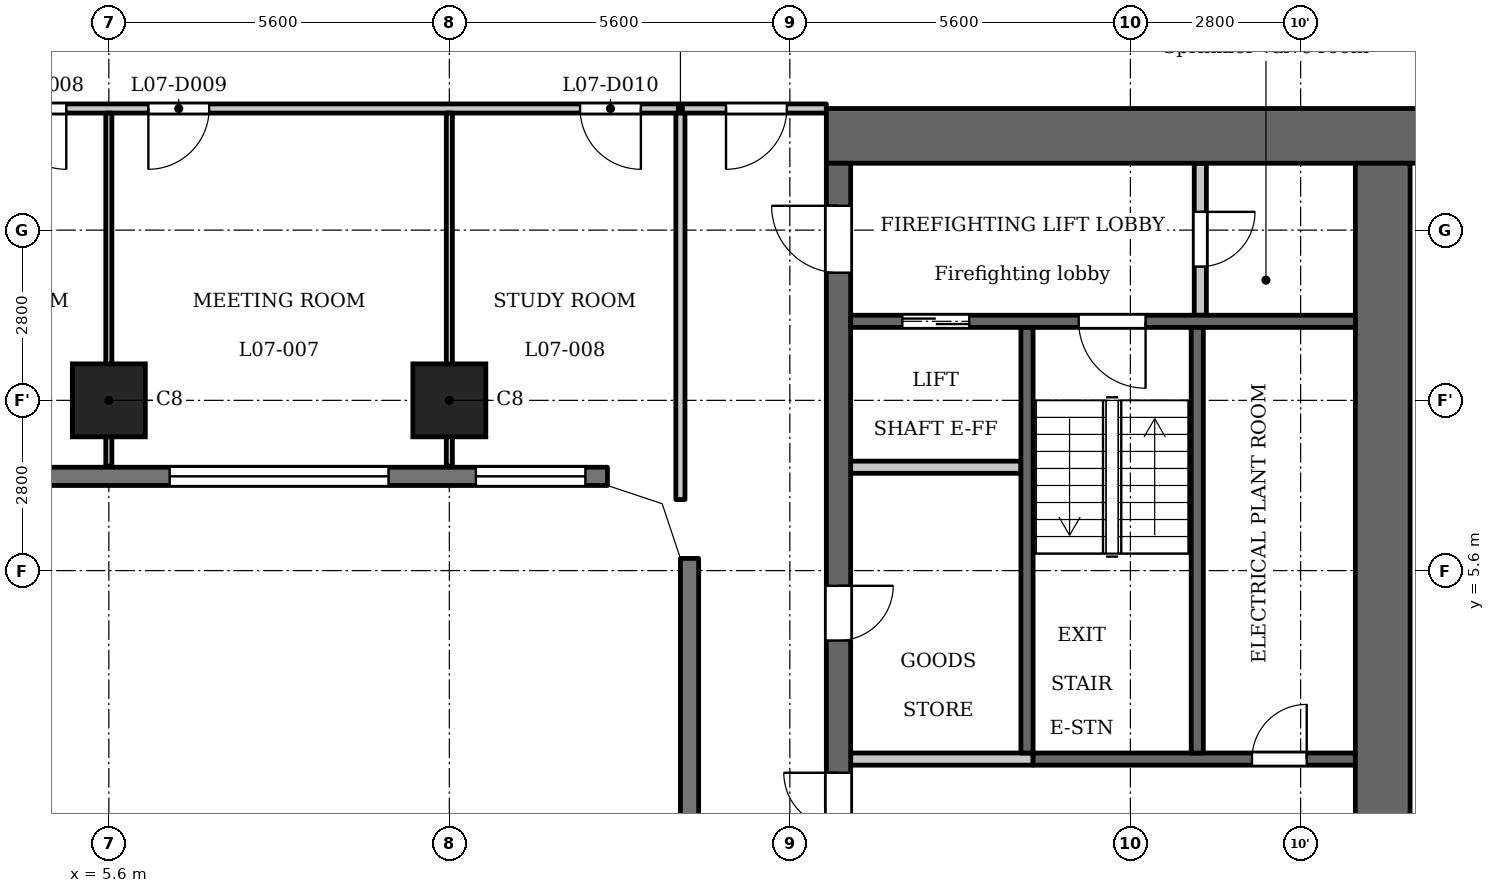
"""IFC4 building model, lengths in metres.
Left out: names, types, materials, properties, quantities, classifications, styles, units other than length and angle.
Written with IfcOpenShell. Run it as: python <this file> out.ifc"""

import sys

from ifc_helpers import new_model, si_unit, direction, frame, frame_2d, origin, origin_2d, place, context, subcontext, project, spatial, polyline, rectangle, outline, extrude, element, fill, save


model = new_model("IFC4")
c1 = context("Model", 3, precision=1e-05, world=origin(), true_north=direction((0.0, 1.0)))
c2 = subcontext(c1, "Body", "Model", "MODEL_VIEW")
j1 = project(units=[si_unit("LENGTHUNIT", "METRE"), si_unit("PLANEANGLEUNIT", "RADIAN")], contexts=[c1])
p1 = place(None, origin())
s1 = spatial("IfcSite", under=j1, at=p1, CompositionType="ELEMENT")
p2 = place(p1, origin())
s2 = spatial("IfcBuilding", under=s1, at=p2, CompositionType="ELEMENT")
p3 = place(p2, frame((0.0, 0.0, 34.0)))
s3 = spatial("IfcBuildingStorey", under=s2, at=p3, CompositionType="ELEMENT", Elevation=34.0)
for number, where, z_axis, x_axis in (
    (1, (5.6, 8.4, 0.0), (0.0, 0.0, 1.0), (1.0, 0.0, 0.0)),
    (2, (11.2, 8.4, 0.0), (0.0, 0.0, 1.0), (1.0, 0.0, 0.0)),
):
    element("IfcColumn", number, at=place(p3, frame(where, z_axis=z_axis, x_axis=x_axis)), inside=s3, PredefinedType="COLUMN", context=c2, shape_type="SweptSolid", body=[
        extrude(rectangle(XDim=1.2, YDim=1.2, at=origin_2d()), origin(), (0.0, 0.0, 1.0), 3.5),
    ])
p4 = place(p3, frame((-13.8, 7.15, 0.0), z_axis=(0.0, 0.0, 1.0), x_axis=(1.0, 0.0, 0.0)))
e3 = element("IfcWall", 3, at=p4, inside=s3, PredefinedType="SOLIDWALL", context=c2, shape_type="SweptSolid", body=[
    extrude(rectangle(XDim=27.6, YDim=0.3, at=frame_2d((13.8, 0.0))), origin(), (0.0, 0.0, 1.0), 3.2),
])
p5 = place(p4, frame((0.363, 0.0, 0.9)))
e4 = element("IfcOpeningElement", 4, at=p5, cuts=e3, PredefinedType="OPENING", context=c2, shape_type="SweptSolid", body=[
    extrude(rectangle(XDim=1.8, YDim=1.25, at=frame_2d((0.9, 0.625))), frame((0.0, 0.16, 0.0), z_axis=(0.0, -1.0, 0.0), x_axis=(1.0, 0.0, 0.0)), (0.0, 0.0, 1.0), 0.32),
])
p6 = place(p4, frame((3.6, 0.0, 1.2)))
e5 = element("IfcOpeningElement", 5, at=p6, cuts=e3, PredefinedType="OPENING", context=c2, shape_type="SweptSolid", body=[
    extrude(rectangle(XDim=3.6, YDim=0.95, at=frame_2d((1.8, 0.475))), frame((0.0, 0.16, 0.0), z_axis=(0.0, -1.0, 0.0), x_axis=(1.0, 0.0, 0.0)), (0.0, 0.0, 1.0), 0.32),
])
p7 = place(p4, frame((9.2, 0.0, 1.2)))
e6 = element("IfcOpeningElement", 6, at=p7, cuts=e3, PredefinedType="OPENING", context=c2, shape_type="SweptSolid", body=[
    extrude(rectangle(XDim=3.6, YDim=0.95, at=frame_2d((1.8, 0.475))), frame((0.0, 0.16, 0.0), z_axis=(0.0, -1.0, 0.0), x_axis=(1.0, 0.0, 0.0)), (0.0, 0.0, 1.0), 0.32),
])
p8 = place(p4, frame((14.8, 0.0, 1.2)))
e7 = element("IfcOpeningElement", 7, at=p8, cuts=e3, PredefinedType="OPENING", context=c2, shape_type="SweptSolid", body=[
    extrude(rectangle(XDim=3.6, YDim=0.95, at=frame_2d((1.8, 0.475))), frame((0.0, 0.16, 0.0), z_axis=(0.0, -1.0, 0.0), x_axis=(1.0, 0.0, 0.0)), (0.0, 0.0, 1.0), 0.32),
])
p9 = place(p4, frame((20.4, 0.0, 1.2)))
e8 = element("IfcOpeningElement", 8, at=p9, cuts=e3, PredefinedType="OPENING", context=c2, shape_type="SweptSolid", body=[
    extrude(rectangle(XDim=3.6, YDim=0.95, at=frame_2d((1.8, 0.475))), frame((0.0, 0.16, 0.0), z_axis=(0.0, -1.0, 0.0), x_axis=(1.0, 0.0, 0.0)), (0.0, 0.0, 1.0), 0.32),
])
p10 = place(p4, frame((25.438, 0.0, 0.9)))
e9 = element("IfcOpeningElement", 9, at=p10, cuts=e3, PredefinedType="OPENING", context=c2, shape_type="SweptSolid", body=[
    extrude(rectangle(XDim=1.8, YDim=1.25, at=frame_2d((0.9, 0.625))), frame((0.0, 0.16, 0.0), z_axis=(0.0, -1.0, 0.0), x_axis=(1.0, 0.0, 0.0)), (0.0, 0.0, 1.0), 0.32),
])
p11 = place(p3, frame((15.15, 5.8, 0.0), z_axis=(0.0, 0.0, 1.0), x_axis=(0.0, -1.0, 0.0)))
e10 = element("IfcWall", 10, at=p11, inside=s3, PredefinedType="SOLIDWALL", context=c2, shape_type="SweptSolid", body=[
    extrude(rectangle(XDim=11.6, YDim=0.3, at=frame_2d((5.8, 0.0))), origin(), (0.0, 0.0, 1.0), 3.2),
])
p12 = place(p3, frame((20.7, 2.6, 0.0), z_axis=(0.0, 0.0, 1.0), x_axis=(0.0, 1.0, 0.0)))
e11 = element("IfcWall", 11, at=p12, inside=s3, PredefinedType="SHEAR", context=c2, shape_type="SweptSolid", body=[
    extrude(rectangle(XDim=7.0, YDim=0.2, at=frame_2d((3.5, 0.0))), origin(), (0.0, 0.0, 1.0), 3.2),
])
p13 = place(p3, frame((20.8, 2.5, 0.0), z_axis=(0.0, 0.0, 1.0), x_axis=(1.0, 0.0, 0.0)))
e12 = element("IfcWall", 12, at=p13, inside=s3, PredefinedType="SHEAR", context=c2, shape_type="SweptSolid", body=[
    extrude(rectangle(XDim=5.3, YDim=0.2, at=frame_2d((2.65, 0.0))), origin(), (0.0, 0.0, 1.0), 3.2),
])
p14 = place(p13, frame((3.6, 0.0, 0.0)))
e13 = element("IfcOpeningElement", 13, at=p14, cuts=e12, PredefinedType="OPENING", context=c2, shape_type="SweptSolid", body=[
    extrude(rectangle(XDim=0.9, YDim=2.1, at=frame_2d((0.45, 1.05))), frame((0.0, 0.11, 0.0), z_axis=(0.0, -1.0, 0.0), x_axis=(1.0, 0.0, 0.0)), (0.0, 0.0, 1.0), 0.22),
])
p15 = place(p3, frame((17.4, 12.75, 0.0), z_axis=(0.0, 0.0, 1.0), x_axis=(1.0, 0.0, 0.0)))
e14 = element("IfcWall", 14, at=p15, inside=s3, PredefinedType="SHEAR", context=c2, shape_type="SweptSolid", body=[
    extrude(rectangle(XDim=10.4, YDim=0.9, at=frame_2d((5.2, 0.0))), origin(), (0.0, 0.0, 1.0), 3.2),
])
p16 = place(p3, frame((17.6, -12.3, 0.0), z_axis=(0.0, 0.0, 1.0), x_axis=(0.0, 1.0, 0.0)))
e15 = element("IfcWall", 15, at=p16, inside=s3, PredefinedType="SHEAR", context=c2, shape_type="SweptSolid", body=[
    extrude(rectangle(XDim=24.6, YDim=0.4, at=frame_2d((12.3, 0.0))), origin(), (0.0, 0.0, 1.0), 3.2),
])
p17 = place(p16, frame((6.0, 0.0, 0.0)))
e16 = element("IfcOpeningElement", 16, at=p17, cuts=e15, PredefinedType="OPENING", context=c2, shape_type="SweptSolid", body=[
    extrude(rectangle(XDim=1.1, YDim=2.1, at=frame_2d((0.55, 1.05))), frame((0.0, 0.21, 0.0), z_axis=(0.0, -1.0, 0.0), x_axis=(1.0, 0.0, 0.0)), (0.0, 0.0, 1.0), 0.42),
])
p18 = place(p16, frame((8.4, 0.0, 0.0)))
e17 = element("IfcOpeningElement", 17, at=p18, cuts=e15, PredefinedType="OPENING", context=c2, shape_type="SweptSolid", body=[
    extrude(rectangle(XDim=1.1, YDim=2.1, at=frame_2d((0.55, 1.05))), frame((0.0, 0.21, 0.0), z_axis=(0.0, -1.0, 0.0), x_axis=(1.0, 0.0, 0.0)), (0.0, 0.0, 1.0), 0.42),
])
p19 = place(p16, frame((10.8, 0.0, 0.0)))
e18 = element("IfcOpeningElement", 18, at=p19, cuts=e15, PredefinedType="OPENING", context=c2, shape_type="SweptSolid", body=[
    extrude(rectangle(XDim=1.1, YDim=2.1, at=frame_2d((0.55, 1.05))), frame((0.0, 0.21, 0.0), z_axis=(0.0, -1.0, 0.0), x_axis=(1.0, 0.0, 0.0)), (0.0, 0.0, 1.0), 0.42),
])
p20 = place(p16, frame((16.75, 0.0, 0.0)))
e19 = element("IfcOpeningElement", 19, at=p20, cuts=e15, PredefinedType="OPENING", context=c2, shape_type="SweptSolid", body=[
    extrude(rectangle(XDim=0.9, YDim=2.1, at=frame_2d((0.45, 1.05))), frame((0.0, 0.21, 0.0), z_axis=(0.0, -1.0, 0.0), x_axis=(1.0, 0.0, 0.0)), (0.0, 0.0, 1.0), 0.42),
])
p21 = place(p16, frame((22.8, 0.0, 0.0)))
e20 = element("IfcOpeningElement", 20, at=p21, cuts=e15, PredefinedType="OPENING", context=c2, shape_type="SweptSolid", body=[
    extrude(rectangle(XDim=1.1, YDim=2.1, at=frame_2d((0.55, 1.05))), frame((0.0, 0.21, 0.0), z_axis=(0.0, -1.0, 0.0), x_axis=(1.0, 0.0, 0.0)), (0.0, 0.0, 1.0), 0.42),
])
p22 = place(p16, frame((0.7, 0.0, 0.0)))
e21 = element("IfcOpeningElement", 21, at=p22, cuts=e15, PredefinedType="OPENING", context=c2, shape_type="SweptSolid", body=[
    extrude(rectangle(XDim=1.1, YDim=2.1, at=frame_2d((0.55, 1.05))), frame((0.0, 0.21, 0.0), z_axis=(0.0, -1.0, 0.0), x_axis=(1.0, 0.0, 0.0)), (0.0, 0.0, 1.0), 0.42),
])
p23 = place(p16, frame((12.775, 0.0, 0.0)))
e22 = element("IfcOpeningElement", 22, at=p23, cuts=e15, PredefinedType="OPENING", context=c2, shape_type="SweptSolid", body=[
    extrude(rectangle(XDim=1.8, YDim=2.1, at=frame_2d((0.9, 1.05))), frame((0.0, 0.21, 0.0), z_axis=(0.0, -1.0, 0.0), x_axis=(1.0, 0.0, 0.0)), (0.0, 0.0, 1.0), 0.42),
])
p24 = place(p3, frame((26.55, -12.3, 0.0), z_axis=(0.0, 0.0, 1.0), x_axis=(0.0, 1.0, 0.0)))
e23 = element("IfcWall", 23, at=p24, inside=s3, PredefinedType="SHEAR", context=c2, shape_type="SweptSolid", body=[
    extrude(rectangle(XDim=24.6, YDim=0.9, at=frame_2d((12.3, 0.0))), origin(), (0.0, 0.0, 1.0), 3.2),
])
p25 = place(p3, frame((23.55, 9.8, 0.0), z_axis=(0.0, 0.0, 1.0), x_axis=(0.0, 1.0, 0.0)))
e24 = element("IfcWall", 24, at=p25, inside=s3, PredefinedType="PARTITIONING", context=c2, shape_type="SweptSolid", body=[
    extrude(rectangle(XDim=2.5, YDim=0.2, at=frame_2d((1.25, 0.0))), origin(), (0.0, 0.0, 1.0), 3.2),
])
p26 = place(p25, frame((0.8, 0.0, 0.0)))
e25 = element("IfcOpeningElement", 25, at=p26, cuts=e24, PredefinedType="OPENING", context=c2, shape_type="SweptSolid", body=[
    extrude(rectangle(XDim=0.9, YDim=2.1, at=frame_2d((0.45, 1.05))), frame((0.0, 0.11, 0.0), z_axis=(0.0, -1.0, 0.0), x_axis=(1.0, 0.0, 0.0)), (0.0, 0.0, 1.0), 0.22),
])
p27 = place(p3, frame((17.8, 2.5, 0.0), z_axis=(0.0, 0.0, 1.0), x_axis=(1.0, 0.0, 0.0)))
e26 = element("IfcWall", 26, at=p27, inside=s3, PredefinedType="PARTITIONING", context=c2, shape_type="SweptSolid", body=[
    extrude(rectangle(XDim=3.0, YDim=0.2, at=frame_2d((1.5, 0.0))), origin(), (0.0, 0.0, 1.0), 3.2),
])
p28 = place(p3, frame((17.8, 7.3, 0.0), z_axis=(0.0, 0.0, 1.0), x_axis=(1.0, 0.0, 0.0)))
e27 = element("IfcWall", 27, at=p28, inside=s3, PredefinedType="PARTITIONING", context=c2, shape_type="SweptSolid", body=[
    extrude(rectangle(XDim=2.8, YDim=0.2, at=frame_2d((1.4, 0.0))), origin(), (0.0, 0.0, 1.0), 3.2),
])
p29 = place(p3, frame((17.8, 9.7, 0.0), z_axis=(0.0, 0.0, 1.0), x_axis=(1.0, 0.0, 0.0)))
e28 = element("IfcWall", 28, at=p29, inside=s3, PredefinedType="SHEAR", context=c2, shape_type="SweptSolid", body=[
    extrude(rectangle(XDim=8.3, YDim=0.2, at=frame_2d((4.15, 0.0))), origin(), (0.0, 0.0, 1.0), 3.2),
])
p30 = place(p29, frame((0.85, 0.0, 0.0)))
e29 = element("IfcOpeningElement", 29, at=p30, cuts=e28, PredefinedType="OPENING", context=c2, shape_type="SweptSolid", body=[
    extrude(rectangle(XDim=1.1, YDim=2.1, at=frame_2d((0.55, 1.05))), frame((0.0, 0.11, 0.0), z_axis=(0.0, -1.0, 0.0), x_axis=(1.0, 0.0, 0.0)), (0.0, 0.0, 1.0), 0.22),
])
p31 = place(p29, frame((3.75, 0.0, 0.0)))
e30 = element("IfcOpeningElement", 30, at=p31, cuts=e28, PredefinedType="OPENING", context=c2, shape_type="SweptSolid", body=[
    extrude(rectangle(XDim=1.1, YDim=2.1, at=frame_2d((0.55, 1.05))), frame((0.0, 0.11, 0.0), z_axis=(0.0, -1.0, 0.0), x_axis=(1.0, 0.0, 0.0)), (0.0, 0.0, 1.0), 0.22),
])
p32 = place(p3, frame((23.5, 2.6, 0.0), z_axis=(0.0, 0.0, 1.0), x_axis=(0.0, 1.0, 0.0)))
e31 = element("IfcWall", 31, at=p32, inside=s3, PredefinedType="SHEAR", context=c2, shape_type="SweptSolid", body=[
    extrude(rectangle(XDim=7.0, YDim=0.2, at=frame_2d((3.5, 0.0))), origin(), (0.0, 0.0, 1.0), 3.2),
])
p33 = place(p3, frame((-17.4, 13.2, 0.0), z_axis=(0.0, 0.0, 1.0), x_axis=(1.0, 0.0, 0.0)))
e32 = element("IfcWall", 32, at=p33, inside=s3, PredefinedType="PARTITIONING", context=c2, shape_type="SweptSolid", body=[
    extrude(rectangle(XDim=34.8, YDim=0.15, at=frame_2d((17.4, 0.0))), origin(), (0.0, 0.0, 1.0), 3.2),
])
p34 = place(p33, frame((0.75, 0.0, 0.0)))
e33 = element("IfcOpeningElement", 33, at=p34, cuts=e32, PredefinedType="OPENING", context=c2, shape_type="SweptSolid", body=[
    extrude(rectangle(XDim=1.0, YDim=2.1, at=frame_2d((0.5, 1.05))), frame((0.0, 0.085, 0.0), z_axis=(0.0, -1.0, 0.0), x_axis=(1.0, 0.0, 0.0)), (0.0, 0.0, 1.0), 0.17),
])
p35 = place(p33, frame((33.15, 0.0, 0.0)))
e34 = element("IfcOpeningElement", 34, at=p35, cuts=e32, PredefinedType="OPENING", context=c2, shape_type="SweptSolid", body=[
    extrude(rectangle(XDim=1.0, YDim=2.1, at=frame_2d((0.5, 1.05))), frame((0.0, 0.085, 0.0), z_axis=(0.0, -1.0, 0.0), x_axis=(1.0, 0.0, 0.0)), (0.0, 0.0, 1.0), 0.17),
])
p36 = place(p33, frame((3.05, 0.0, 0.0)))
e35 = element("IfcOpeningElement", 35, at=p36, cuts=e32, PredefinedType="OPENING", context=c2, shape_type="SweptSolid", body=[
    extrude(rectangle(XDim=1.0, YDim=2.1, at=frame_2d((0.5, 1.05))), frame((0.0, 0.085, 0.0), z_axis=(0.0, -1.0, 0.0), x_axis=(1.0, 0.0, 0.0)), (0.0, 0.0, 1.0), 0.17),
])
p37 = place(p33, frame((10.1, 0.0, 0.0)))
e36 = element("IfcOpeningElement", 36, at=p37, cuts=e32, PredefinedType="OPENING", context=c2, shape_type="SweptSolid", body=[
    extrude(rectangle(XDim=1.0, YDim=2.1, at=frame_2d((0.5, 1.05))), frame((0.0, 0.085, 0.0), z_axis=(0.0, -1.0, 0.0), x_axis=(1.0, 0.0, 0.0)), (0.0, 0.0, 1.0), 0.17),
])
p38 = place(p33, frame((12.45, 0.0, 0.0)))
e37 = element("IfcOpeningElement", 37, at=p38, cuts=e32, PredefinedType="OPENING", context=c2, shape_type="SweptSolid", body=[
    extrude(rectangle(XDim=1.0, YDim=2.1, at=frame_2d((0.5, 1.05))), frame((0.0, 0.085, 0.0), z_axis=(0.0, -1.0, 0.0), x_axis=(1.0, 0.0, 0.0)), (0.0, 0.0, 1.0), 0.17),
])
p39 = place(p33, frame((21.3, 0.0, 0.0)))
e38 = element("IfcOpeningElement", 38, at=p39, cuts=e32, PredefinedType="OPENING", context=c2, shape_type="SweptSolid", body=[
    extrude(rectangle(XDim=1.0, YDim=2.1, at=frame_2d((0.5, 1.05))), frame((0.0, 0.085, 0.0), z_axis=(0.0, -1.0, 0.0), x_axis=(1.0, 0.0, 0.0)), (0.0, 0.0, 1.0), 0.17),
])
p40 = place(p33, frame((23.65, 0.0, 0.0)))
e39 = element("IfcOpeningElement", 39, at=p40, cuts=e32, PredefinedType="OPENING", context=c2, shape_type="SweptSolid", body=[
    extrude(rectangle(XDim=1.0, YDim=2.1, at=frame_2d((0.5, 1.05))), frame((0.0, 0.085, 0.0), z_axis=(0.0, -1.0, 0.0), x_axis=(1.0, 0.0, 0.0)), (0.0, 0.0, 1.0), 0.17),
])
p41 = place(p33, frame((30.75, 0.0, 0.0)))
e40 = element("IfcOpeningElement", 40, at=p41, cuts=e32, PredefinedType="OPENING", context=c2, shape_type="SweptSolid", body=[
    extrude(rectangle(XDim=1.0, YDim=2.1, at=frame_2d((0.5, 1.05))), frame((0.0, 0.085, 0.0), z_axis=(0.0, -1.0, 0.0), x_axis=(1.0, 0.0, 0.0)), (0.0, 0.0, 1.0), 0.17),
])
for number, where, z_axis, x_axis in (
    (41, (5.6, 7.32, 0.0), (0.0, 0.0, 1.0), (0.0, 1.0, 0.0)),
    (42, (11.2, 7.32, 0.0), (0.0, 0.0, 1.0), (0.0, 1.0, 0.0)),
):
    element("IfcWall", number, at=place(p3, frame(where, z_axis=z_axis, x_axis=x_axis)), inside=s3, PredefinedType="PARTITIONING", context=c2, shape_type="SweptSolid", body=[
        extrude(rectangle(XDim=5.805, YDim=0.1, at=frame_2d((2.902, 0.0))), origin(), (0.0, 0.0, 1.0), 3.2),
    ])
p42 = place(p3, frame((15.0, 6.769, 0.0), z_axis=(0.0, 0.0, 1.0), x_axis=(0.0, 1.0, 0.0)))
e43 = element("IfcWall", 43, at=p42, inside=s3, PredefinedType="PARTITIONING", context=c2, shape_type="SweptSolid", body=[
    extrude(rectangle(XDim=6.356, YDim=0.15, at=frame_2d((3.178, 0.0))), origin(), (0.0, 0.0, 1.0), 3.2),
])
p43 = place(p3, origin())
e44 = element("IfcWall", 44, at=p43, inside=s3, PredefinedType="SOLIDWALL", context=c2, shape_type="SweptSolid", body=[
    extrude(outline(polyline([(14.937, 6.937), (13.849, 7.3), (13.8, 7.3), (13.8, 7.0), (14.7, 6.7), (15.0, 5.8), (15.3, 5.8), (15.3, 5.849), (14.937, 6.937)])), origin(), (0.0, 0.0, 1.0), 3.2),
])
p44 = place(p20, origin())
e45 = element("IfcDoor", 45, at=p44, inside=s3, OperationType="SINGLE_SWING_RIGHT", PredefinedType="DOOR", context=c2, shape_type="SweptSolid", body=[
    extrude(rectangle(XDim=0.9, YDim=2.1, at=frame_2d((0.45, 1.05))), frame((0.0, 0.025, 0.0), z_axis=(0.0, -1.0, 0.0), x_axis=(1.0, 0.0, 0.0)), (0.0, 0.0, 1.0), 0.05),
])
fill(e19, e45)
p45 = place(p30, origin())
e46 = element("IfcDoor", 46, at=p45, inside=s3, OperationType="DOUBLE_DOOR_SLIDING", PredefinedType="DOOR", context=c2, shape_type="SweptSolid", body=[
    extrude(rectangle(XDim=1.1, YDim=2.1, at=frame_2d((0.55, 1.05))), frame((0.0, 0.025, 0.0), z_axis=(0.0, -1.0, 0.0), x_axis=(1.0, 0.0, 0.0)), (0.0, 0.0, 1.0), 0.05),
])
fill(e29, e46)
p46 = place(p21, origin())
e47 = element("IfcDoor", 47, at=p46, inside=s3, OperationType="SINGLE_SWING_LEFT", PredefinedType="DOOR", context=c2, shape_type="SweptSolid", body=[
    extrude(rectangle(XDim=1.1, YDim=2.1, at=frame_2d((0.55, 1.05))), frame((0.0, 0.025, 0.0), z_axis=(0.0, -1.0, 0.0), x_axis=(1.0, 0.0, 0.0)), (0.0, 0.0, 1.0), 0.05),
])
fill(e20, e47)
p47 = place(p26, origin())
e48 = element("IfcDoor", 48, at=p47, inside=s3, OperationType="SINGLE_SWING_RIGHT", PredefinedType="DOOR", context=c2, shape_type="SweptSolid", body=[
    extrude(rectangle(XDim=0.9, YDim=2.1, at=frame_2d((0.45, 1.05))), frame((0.0, 0.025, 0.0), z_axis=(0.0, -1.0, 0.0), x_axis=(1.0, 0.0, 0.0)), (0.0, 0.0, 1.0), 0.05),
])
fill(e25, e48)
p48 = place(p31, origin())
e49 = element("IfcDoor", 49, at=p48, inside=s3, OperationType="SINGLE_SWING_RIGHT", PredefinedType="DOOR", context=c2, shape_type="SweptSolid", body=[
    extrude(rectangle(XDim=1.1, YDim=2.1, at=frame_2d((0.55, 1.05))), frame((0.0, 0.025, 0.0), z_axis=(0.0, -1.0, 0.0), x_axis=(1.0, 0.0, 0.0)), (0.0, 0.0, 1.0), 0.05),
])
fill(e30, e49)
p49 = place(p23, origin())
e50 = element("IfcDoor", 50, at=p49, inside=s3, OperationType="DOUBLE_DOOR_SINGLE_SWING", PredefinedType="DOOR", context=c2, shape_type="SweptSolid", body=[
    extrude(rectangle(XDim=1.8, YDim=2.1, at=frame_2d((0.9, 1.05))), frame((0.0, 0.025, 0.0), z_axis=(0.0, -1.0, 0.0), x_axis=(1.0, 0.0, 0.0)), (0.0, 0.0, 1.0), 0.05),
])
fill(e22, e50)
p50 = place(p14, origin())
e51 = element("IfcDoor", 51, at=p50, inside=s3, OperationType="SINGLE_SWING_LEFT", PredefinedType="DOOR", context=c2, shape_type="SweptSolid", body=[
    extrude(rectangle(XDim=0.9, YDim=2.1, at=frame_2d((0.45, 1.05))), frame((0.0, 0.025, 0.0), z_axis=(0.0, -1.0, 0.0), x_axis=(1.0, 0.0, 0.0)), (0.0, 0.0, 1.0), 0.05),
])
fill(e13, e51)
p51 = place(p35, origin())
e52 = element("IfcDoor", 52, at=p51, inside=s3, OperationType="SINGLE_SWING_LEFT", PredefinedType="DOOR", context=c2, shape_type="SweptSolid", body=[
    extrude(rectangle(XDim=1.0, YDim=2.1, at=frame_2d((0.5, 1.05))), frame((0.0, 0.025, 0.0), z_axis=(0.0, -1.0, 0.0), x_axis=(1.0, 0.0, 0.0)), (0.0, 0.0, 1.0), 0.05),
])
fill(e34, e52)
p52 = place(p39, origin())
e53 = element("IfcDoor", 53, at=p52, inside=s3, OperationType="SINGLE_SWING_RIGHT", PredefinedType="DOOR", context=c2, shape_type="SweptSolid", body=[
    extrude(rectangle(XDim=1.0, YDim=2.1, at=frame_2d((0.5, 1.05))), frame((0.0, 0.025, 0.0), z_axis=(0.0, -1.0, 0.0), x_axis=(1.0, 0.0, 0.0)), (0.0, 0.0, 1.0), 0.05),
])
fill(e38, e53)
p53 = place(p40, origin())
e54 = element("IfcDoor", 54, at=p53, inside=s3, OperationType="SINGLE_SWING_LEFT", PredefinedType="DOOR", context=c2, shape_type="SweptSolid", body=[
    extrude(rectangle(XDim=1.0, YDim=2.1, at=frame_2d((0.5, 1.05))), frame((0.0, 0.025, 0.0), z_axis=(0.0, -1.0, 0.0), x_axis=(1.0, 0.0, 0.0)), (0.0, 0.0, 1.0), 0.05),
])
fill(e39, e54)
p54 = place(p41, origin())
e55 = element("IfcDoor", 55, at=p54, inside=s3, OperationType="SINGLE_SWING_RIGHT", PredefinedType="DOOR", context=c2, shape_type="SweptSolid", body=[
    extrude(rectangle(XDim=1.0, YDim=2.1, at=frame_2d((0.5, 1.05))), frame((0.0, 0.025, 0.0), z_axis=(0.0, -1.0, 0.0), x_axis=(1.0, 0.0, 0.0)), (0.0, 0.0, 1.0), 0.05),
])
fill(e40, e55)
p55 = place(p9, origin())
e56 = element("IfcWindow", 56, at=p55, inside=s3, PartitioningType="SINGLE_PANEL", PredefinedType="WINDOW", context=c2, shape_type="SweptSolid", body=[
    extrude(rectangle(XDim=3.6, YDim=0.95, at=frame_2d((1.8, 0.475))), frame((0.0, 0.03, 0.0), z_axis=(0.0, -1.0, 0.0), x_axis=(1.0, 0.0, 0.0)), (0.0, 0.0, 1.0), 0.06),
])
fill(e8, e56)
p56 = place(p10, origin())
e57 = element("IfcWindow", 57, at=p56, inside=s3, PartitioningType="SINGLE_PANEL", PredefinedType="WINDOW", context=c2, shape_type="SweptSolid", body=[
    extrude(rectangle(XDim=1.8, YDim=1.25, at=frame_2d((0.9, 0.625))), frame((0.0, 0.03, 0.0), z_axis=(0.0, -1.0, 0.0), x_axis=(1.0, 0.0, 0.0)), (0.0, 0.0, 1.0), 0.06),
])
fill(e9, e57)
save(model, sys.argv[1])
